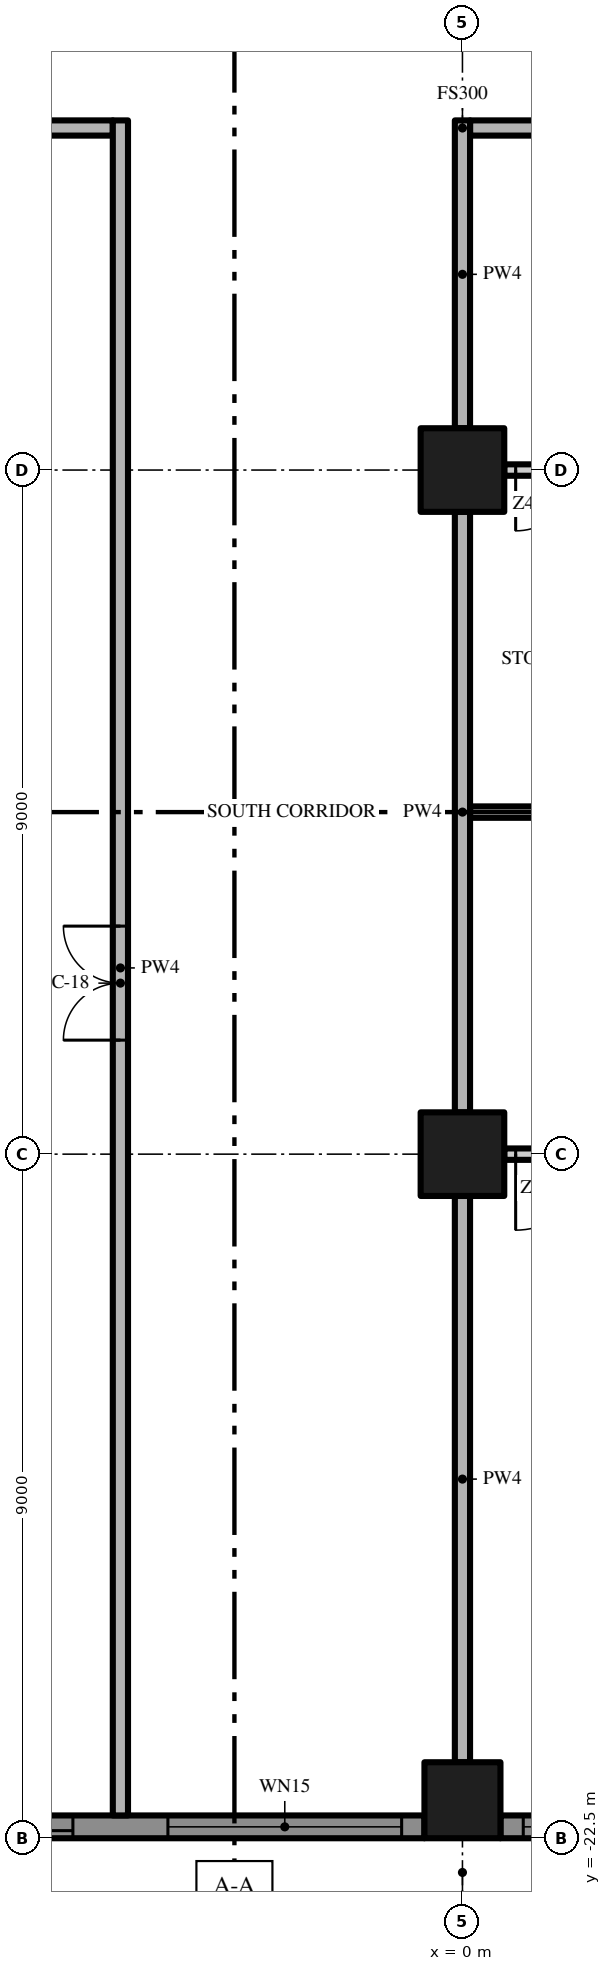
"""IFC4 building model, lengths in metres.
Left out: names, types, materials, properties, quantities, classifications, styles, units other than length and angle.
Written with IfcOpenShell. Run it as: python <this file> out.ifc"""

import sys

from ifc_helpers import new_model, si_unit, direction, frame, frame_2d, origin, origin_2d, place, context, subcontext, project, spatial, polyline, rectangle, outline, extrude, element, fill, save


model = new_model("IFC4")
c1 = context("Model", 3, precision=1e-05, world=origin(), true_north=direction((0.0, 1.0)))
c2 = subcontext(c1, "Body", "Model", "MODEL_VIEW")
j1 = project(units=[si_unit("LENGTHUNIT", "METRE"), si_unit("PLANEANGLEUNIT", "RADIAN")], contexts=[c1])
p1 = place(None, origin())
s1 = spatial("IfcSite", under=j1, at=p1, CompositionType="ELEMENT")
p2 = place(p1, origin())
s2 = spatial("IfcBuilding", under=s1, at=p2, CompositionType="ELEMENT")
p3 = place(p2, frame((0.0, 0.0, 214.8)))
s3 = spatial("IfcBuildingStorey", under=s2, at=p3, CompositionType="ELEMENT", Elevation=214.8)
p4 = place(p3, frame((0.0, -13.5, 0.0), z_axis=(0.0, 0.0, 1.0), x_axis=(1.0, 0.0, 0.0)))
e1 = element("IfcColumn", 1, at=p4, inside=s3, PredefinedType="COLUMN", context=c2, shape_type="SweptSolid", body=[
    extrude(rectangle(XDim=1.1, YDim=1.1, at=origin_2d()), origin(), (0.0, 0.0, 1.0), 3.5),
])
p5 = place(p3, frame((0.0, -22.0, 0.0), z_axis=(0.0, 0.0, 1.0), x_axis=(1.0, 0.0, 0.0)))
e2 = element("IfcColumn", 2, at=p5, inside=s3, PredefinedType="COLUMN", context=c2, shape_type="SweptSolid", body=[
    extrude(rectangle(XDim=1.0, YDim=1.0, at=origin_2d()), origin(), (0.0, 0.0, 1.0), 3.5),
])
p6 = place(p3, frame((0.0, -4.5, 0.0), z_axis=(0.0, 0.0, 1.0), x_axis=(1.0, 0.0, 0.0)))
e3 = element("IfcColumn", 3, at=p6, inside=s3, PredefinedType="COLUMN", context=c2, shape_type="SweptSolid", body=[
    extrude(rectangle(XDim=1.1, YDim=1.1, at=origin_2d()), origin(), (0.0, 0.0, 1.0), 3.5),
])
p7 = place(p3, frame((-0.5, -22.35, 0.0), z_axis=(0.0, 0.0, 1.0), x_axis=(-1.0, 0.0, 0.0)))
e4 = element("IfcWall", 4, at=p7, inside=s3, PredefinedType="SOLIDWALL", context=c2, shape_type="SweptSolid", body=[
    extrude(rectangle(XDim=8.0, YDim=0.3, at=frame_2d((4.0, 0.0))), origin(), (0.0, 0.0, 1.0), 3.5),
])
p8 = place(p7, frame((4.625, 0.0, 0.0)))
e5 = element("IfcOpeningElement", 5, at=p8, cuts=e4, PredefinedType="OPENING", context=c2, shape_type="SweptSolid", body=[
    extrude(rectangle(XDim=3.075, YDim=2.4, at=frame_2d((1.538, 1.2))), frame((0.0, 0.16, 0.0), z_axis=(0.0, -1.0, 0.0), x_axis=(1.0, 0.0, 0.0)), (0.0, 0.0, 1.0), 0.32),
])
p9 = place(p7, frame((0.3, 0.0, 0.45)))
e6 = element("IfcOpeningElement", 6, at=p9, cuts=e4, PredefinedType="OPENING", context=c2, shape_type="SweptSolid", body=[
    extrude(rectangle(XDim=3.075, YDim=2.65, at=frame_2d((1.538, 1.325))), frame((0.0, 0.16, 0.0), z_axis=(0.0, -1.0, 0.0), x_axis=(1.0, 0.0, 0.0)), (0.0, 0.0, 1.0), 0.32),
])
p10 = place(p3, frame((8.5, -22.35, 0.0), z_axis=(0.0, 0.0, 1.0), x_axis=(-1.0, 0.0, 0.0)))
e7 = element("IfcWall", 7, at=p10, inside=s3, PredefinedType="SOLIDWALL", context=c2, shape_type="SweptSolid", body=[
    extrude(rectangle(XDim=8.0, YDim=0.3, at=frame_2d((4.0, 0.0))), origin(), (0.0, 0.0, 1.0), 3.5),
])
p11 = place(p10, frame((4.625, 0.0, 0.45)))
e8 = element("IfcOpeningElement", 8, at=p11, cuts=e7, PredefinedType="OPENING", context=c2, shape_type="SweptSolid", body=[
    extrude(rectangle(XDim=3.075, YDim=2.65, at=frame_2d((1.538, 1.325))), frame((0.0, 0.16, 0.0), z_axis=(0.0, -1.0, 0.0), x_axis=(1.0, 0.0, 0.0)), (0.0, 0.0, 1.0), 0.32),
])
p12 = place(p10, frame((0.3, 0.0, 0.0)))
e9 = element("IfcOpeningElement", 9, at=p12, cuts=e7, PredefinedType="OPENING", context=c2, shape_type="SweptSolid", body=[
    extrude(rectangle(XDim=3.075, YDim=2.4, at=frame_2d((1.538, 1.2))), frame((0.0, 0.16, 0.0), z_axis=(0.0, -1.0, 0.0), x_axis=(1.0, 0.0, 0.0)), (0.0, 0.0, 1.0), 0.32),
])
p13 = place(p3, origin())
e10 = element("IfcWall", 10, at=p13, inside=s3, PredefinedType="USERDEFINED", context=c2, shape_type="SweptSolid", body=[
    extrude(outline(polyline([(-22.5, -25.149), (-21.0, -25.485), (-20.625, -25.5), (-19.5, -25.369), (-18.0, -24.845), (-16.5, -24.112), (-15.0, -23.451), (-13.5, -23.115), (-13.125, -23.1), (-12.0, -23.231), (-10.5, -23.755), (-9.0, -24.488), (-7.5, -25.149), (-6.0, -25.485), (-5.625, -25.5), (-4.5, -25.369), (-3.0, -24.845), (-1.5, -24.112), (0.0, -23.451), (1.5, -23.115), (1.875, -23.1), (3.0, -23.231), (4.5, -23.755), (6.0, -24.488), (7.5, -25.149), (9.0, -25.485), (9.375, -25.5), (10.5, -25.369), (12.0, -24.845), (13.5, -24.112), (15.0, -23.451), (16.5, -23.115), (16.875, -23.1), (18.0, -23.231), (19.5, -23.755), (21.0, -24.488), (22.5, -25.149), (22.601, -24.92), (21.105, -24.261), (19.596, -23.524), (18.056, -22.986), (16.885, -22.849), (16.467, -22.866), (14.921, -23.213), (13.395, -23.885), (11.904, -24.614), (10.444, -25.124), (9.365, -25.249), (9.033, -25.236), (7.579, -24.91), (6.105, -24.261), (4.596, -23.524), (3.056, -22.986), (1.885, -22.849), (1.467, -22.866), (-0.079, -23.213), (-1.605, -23.885), (-3.096, -24.614), (-4.556, -25.124), (-5.635, -25.249), (-5.967, -25.236), (-7.421, -24.91), (-8.895, -24.261), (-10.404, -23.524), (-11.944, -22.986), (-13.115, -22.849), (-13.533, -22.866), (-15.079, -23.213), (-16.605, -23.885), (-18.096, -24.614), (-19.556, -25.124), (-20.635, -25.249), (-20.967, -25.236), (-22.445, -24.905), (-22.5, -25.149)])), origin(), (0.0, 0.0, 1.0), 0.9),
])
p14 = place(p3, frame((8.45, -13.5, 0.0), z_axis=(0.0, 0.0, 1.0), x_axis=(-1.0, 0.0, 0.0)))
e11 = element("IfcWall", 11, at=p14, inside=s3, PredefinedType="PARTITIONING", context=c2, shape_type="SweptSolid", body=[
    extrude(rectangle(XDim=7.9, YDim=0.15, at=frame_2d((3.95, 0.0))), origin(), (0.0, 0.0, 1.0), 3.5),
])
p15 = place(p14, frame((6.75, 0.0, 0.0)))
e12 = element("IfcOpeningElement", 12, at=p15, cuts=e11, PredefinedType="OPENING", context=c2, shape_type="SweptSolid", body=[
    extrude(rectangle(XDim=1.0, YDim=2.4, at=frame_2d((0.5, 1.2))), frame((0.0, 0.085, 0.0), z_axis=(0.0, -1.0, 0.0), x_axis=(1.0, 0.0, 0.0)), (0.0, 0.0, 1.0), 0.17),
])
p16 = place(p14, frame((0.15, 0.0, 0.0)))
e13 = element("IfcOpeningElement", 13, at=p16, cuts=e11, PredefinedType="OPENING", context=c2, shape_type="SweptSolid", body=[
    extrude(rectangle(XDim=1.0, YDim=2.4, at=frame_2d((0.5, 1.2))), frame((0.0, 0.085, 0.0), z_axis=(0.0, -1.0, 0.0), x_axis=(1.0, 0.0, 0.0)), (0.0, 0.0, 1.0), 0.17),
])
p17 = place(p3, frame((0.1, -9.0, 0.0), z_axis=(0.0, 0.0, 1.0), x_axis=(1.0, 0.0, 0.0)))
e14 = element("IfcWall", 14, at=p17, inside=s3, PredefinedType="PARTITIONING", context=c2, shape_type="SweptSolid", body=[
    extrude(rectangle(XDim=11.525, YDim=0.15, at=frame_2d((5.763, 0.0))), origin(), (0.0, 0.0, 1.0), 3.5),
])
p18 = place(p17, frame((5.85, 0.0, 0.0)))
e15 = element("IfcOpeningElement", 15, at=p18, cuts=e14, PredefinedType="OPENING", context=c2, shape_type="SweptSolid", body=[
    extrude(rectangle(XDim=1.0, YDim=2.4, at=frame_2d((0.5, 1.2))), frame((0.0, 0.085, 0.0), z_axis=(0.0, -1.0, 0.0), x_axis=(1.0, 0.0, 0.0)), (0.0, 0.0, 1.0), 0.17),
])
p19 = place(p3, frame((8.45, -4.5, 0.0), z_axis=(0.0, 0.0, 1.0), x_axis=(-1.0, 0.0, 0.0)))
e16 = element("IfcWall", 16, at=p19, inside=s3, PredefinedType="PARTITIONING", context=c2, shape_type="SweptSolid", body=[
    extrude(rectangle(XDim=7.9, YDim=0.15, at=frame_2d((3.95, 0.0))), origin(), (0.0, 0.0, 1.0), 3.5),
])
p20 = place(p19, frame((6.95, 0.0, 0.0)))
e17 = element("IfcOpeningElement", 17, at=p20, cuts=e16, PredefinedType="OPENING", context=c2, shape_type="SweptSolid", body=[
    extrude(rectangle(XDim=0.8, YDim=2.0, at=frame_2d((0.4, 1.0))), frame((0.0, 0.085, 0.0), z_axis=(0.0, -1.0, 0.0), x_axis=(1.0, 0.0, 0.0)), (0.0, 0.0, 1.0), 0.17),
])
p21 = place(p19, frame((5.45, 0.0, 0.0)))
e18 = element("IfcOpeningElement", 18, at=p21, cuts=e16, PredefinedType="OPENING", context=c2, shape_type="SweptSolid", body=[
    extrude(rectangle(XDim=0.8, YDim=2.0, at=frame_2d((0.4, 1.0))), frame((0.0, 0.085, 0.0), z_axis=(0.0, -1.0, 0.0), x_axis=(1.0, 0.0, 0.0)), (0.0, 0.0, 1.0), 0.17),
])
p22 = place(p3, frame((-17.4, 0.0, 0.0), z_axis=(0.0, 0.0, 1.0), x_axis=(1.0, 0.0, 0.0)))
e19 = element("IfcWall", 19, at=p22, inside=s3, PredefinedType="PARTITIONING", context=c2, shape_type="SweptSolid", body=[
    extrude(rectangle(XDim=12.8, YDim=0.2, at=frame_2d((6.4, 0.0))), origin(), (0.0, 0.0, 1.0), 3.5),
])
p23 = place(p3, frame((17.4, 0.0, 0.0), z_axis=(0.0, 0.0, 1.0), x_axis=(-1.0, 0.0, 0.0)))
e20 = element("IfcWall", 20, at=p23, inside=s3, PredefinedType="PARTITIONING", context=c2, shape_type="SweptSolid", body=[
    extrude(rectangle(XDim=17.3, YDim=0.2, at=frame_2d((8.65, 0.0))), origin(), (0.0, 0.0, 1.0), 3.5),
])
p24 = place(p23, frame((7.65, 0.0, 0.0)))
e21 = element("IfcOpeningElement", 21, at=p24, cuts=e20, PredefinedType="OPENING", context=c2, shape_type="SweptSolid", body=[
    extrude(rectangle(XDim=1.5, YDim=2.4, at=frame_2d((0.75, 1.2))), frame((0.0, 0.11, 0.0), z_axis=(0.0, -1.0, 0.0), x_axis=(1.0, 0.0, 0.0)), (0.0, 0.0, 1.0), 0.22),
])
p25 = place(p3, frame((-4.5, -22.2, 0.0), z_axis=(0.0, 0.0, 1.0), x_axis=(0.0, 1.0, 0.0)))
e22 = element("IfcWall", 22, at=p25, inside=s3, PredefinedType="PARTITIONING", context=c2, shape_type="SweptSolid", body=[
    extrude(rectangle(XDim=22.3, YDim=0.2, at=frame_2d((11.15, 0.0))), origin(), (0.0, 0.0, 1.0), 3.5),
])
p26 = place(p25, frame((10.2, 0.0, 0.0)))
e23 = element("IfcOpeningElement", 23, at=p26, cuts=e22, PredefinedType="OPENING", context=c2, shape_type="SweptSolid", body=[
    extrude(rectangle(XDim=1.5, YDim=2.4, at=frame_2d((0.75, 1.2))), frame((0.0, 0.11, 0.0), z_axis=(0.0, -1.0, 0.0), x_axis=(1.0, 0.0, 0.0)), (0.0, 0.0, 1.0), 0.22),
])
p27 = place(p3, frame((0.0, -21.5, 0.0), z_axis=(0.0, 0.0, 1.0), x_axis=(0.0, 1.0, 0.0)))
e24 = element("IfcWall", 24, at=p27, inside=s3, PredefinedType="PARTITIONING", context=c2, shape_type="SweptSolid", body=[
    extrude(rectangle(XDim=7.45, YDim=0.2, at=frame_2d((3.725, 0.0))), origin(), (0.0, 0.0, 1.0), 3.5),
])
p28 = place(p3, frame((0.0, -12.95, 0.0), z_axis=(0.0, 0.0, 1.0), x_axis=(0.0, 1.0, 0.0)))
e25 = element("IfcWall", 25, at=p28, inside=s3, PredefinedType="PARTITIONING", context=c2, shape_type="SweptSolid", body=[
    extrude(rectangle(XDim=7.9, YDim=0.2, at=frame_2d((3.95, 0.0))), origin(), (0.0, 0.0, 1.0), 3.5),
])
p29 = place(p3, frame((0.0, -3.95, 0.0), z_axis=(0.0, 0.0, 1.0), x_axis=(0.0, 1.0, 0.0)))
e26 = element("IfcWall", 26, at=p29, inside=s3, PredefinedType="PARTITIONING", context=c2, shape_type="SweptSolid", body=[
    extrude(rectangle(XDim=4.05, YDim=0.2, at=frame_2d((2.025, 0.0))), origin(), (0.0, 0.0, 1.0), 3.5),
])
p30 = place(p8, origin())
e27 = element("IfcDoor", 27, at=p30, inside=s3, OperationType="SINGLE_SWING_LEFT", PredefinedType="DOOR", context=c2, shape_type="SweptSolid", body=[
    extrude(rectangle(XDim=3.075, YDim=2.4, at=frame_2d((1.538, 1.2))), frame((0.0, 0.025, 0.0), z_axis=(0.0, -1.0, 0.0), x_axis=(1.0, 0.0, 0.0)), (0.0, 0.0, 1.0), 0.05),
])
fill(e5, e27)
p31 = place(p9, origin())
e28 = element("IfcWindow", 28, at=p31, inside=s3, PartitioningType="SINGLE_PANEL", PredefinedType="WINDOW", context=c2, shape_type="SweptSolid", body=[
    extrude(rectangle(XDim=3.075, YDim=2.65, at=frame_2d((1.538, 1.325))), frame((0.0, 0.03, 0.0), z_axis=(0.0, -1.0, 0.0), x_axis=(1.0, 0.0, 0.0)), (0.0, 0.0, 1.0), 0.06),
])
fill(e6, e28)
p32 = place(p11, origin())
e29 = element("IfcWindow", 29, at=p32, inside=s3, PartitioningType="SINGLE_PANEL", PredefinedType="WINDOW", context=c2, shape_type="SweptSolid", body=[
    extrude(rectangle(XDim=3.075, YDim=2.65, at=frame_2d((1.538, 1.325))), frame((0.0, 0.03, 0.0), z_axis=(0.0, -1.0, 0.0), x_axis=(1.0, 0.0, 0.0)), (0.0, 0.0, 1.0), 0.06),
])
fill(e8, e29)
p33 = place(p26, origin())
e30 = element("IfcDoor", 30, at=p33, inside=s3, OperationType="DOUBLE_DOOR_SINGLE_SWING", PredefinedType="DOOR", context=c2, shape_type="SweptSolid", body=[
    extrude(rectangle(XDim=1.5, YDim=2.4, at=frame_2d((0.75, 1.2))), frame((0.0, 0.025, 0.0), z_axis=(0.0, -1.0, 0.0), x_axis=(1.0, 0.0, 0.0)), (0.0, 0.0, 1.0), 0.05),
])
fill(e23, e30)
p34 = place(p20, origin())
e31 = element("IfcDoor", 31, at=p34, inside=s3, OperationType="SINGLE_SWING_RIGHT", PredefinedType="DOOR", context=c2, shape_type="SweptSolid", body=[
    extrude(rectangle(XDim=0.8, YDim=2.0, at=frame_2d((0.4, 1.0))), frame((0.0, 0.025, 0.0), z_axis=(0.0, -1.0, 0.0), x_axis=(1.0, 0.0, 0.0)), (0.0, 0.0, 1.0), 0.05),
])
fill(e17, e31)
p35 = place(p15, origin())
e32 = element("IfcDoor", 32, at=p35, inside=s3, OperationType="SINGLE_SWING_RIGHT", PredefinedType="DOOR", context=c2, shape_type="SweptSolid", body=[
    extrude(rectangle(XDim=1.0, YDim=2.4, at=frame_2d((0.5, 1.2))), frame((0.0, 0.025, 0.0), z_axis=(0.0, -1.0, 0.0), x_axis=(1.0, 0.0, 0.0)), (0.0, 0.0, 1.0), 0.05),
])
fill(e12, e32)
save(model, sys.argv[1])
